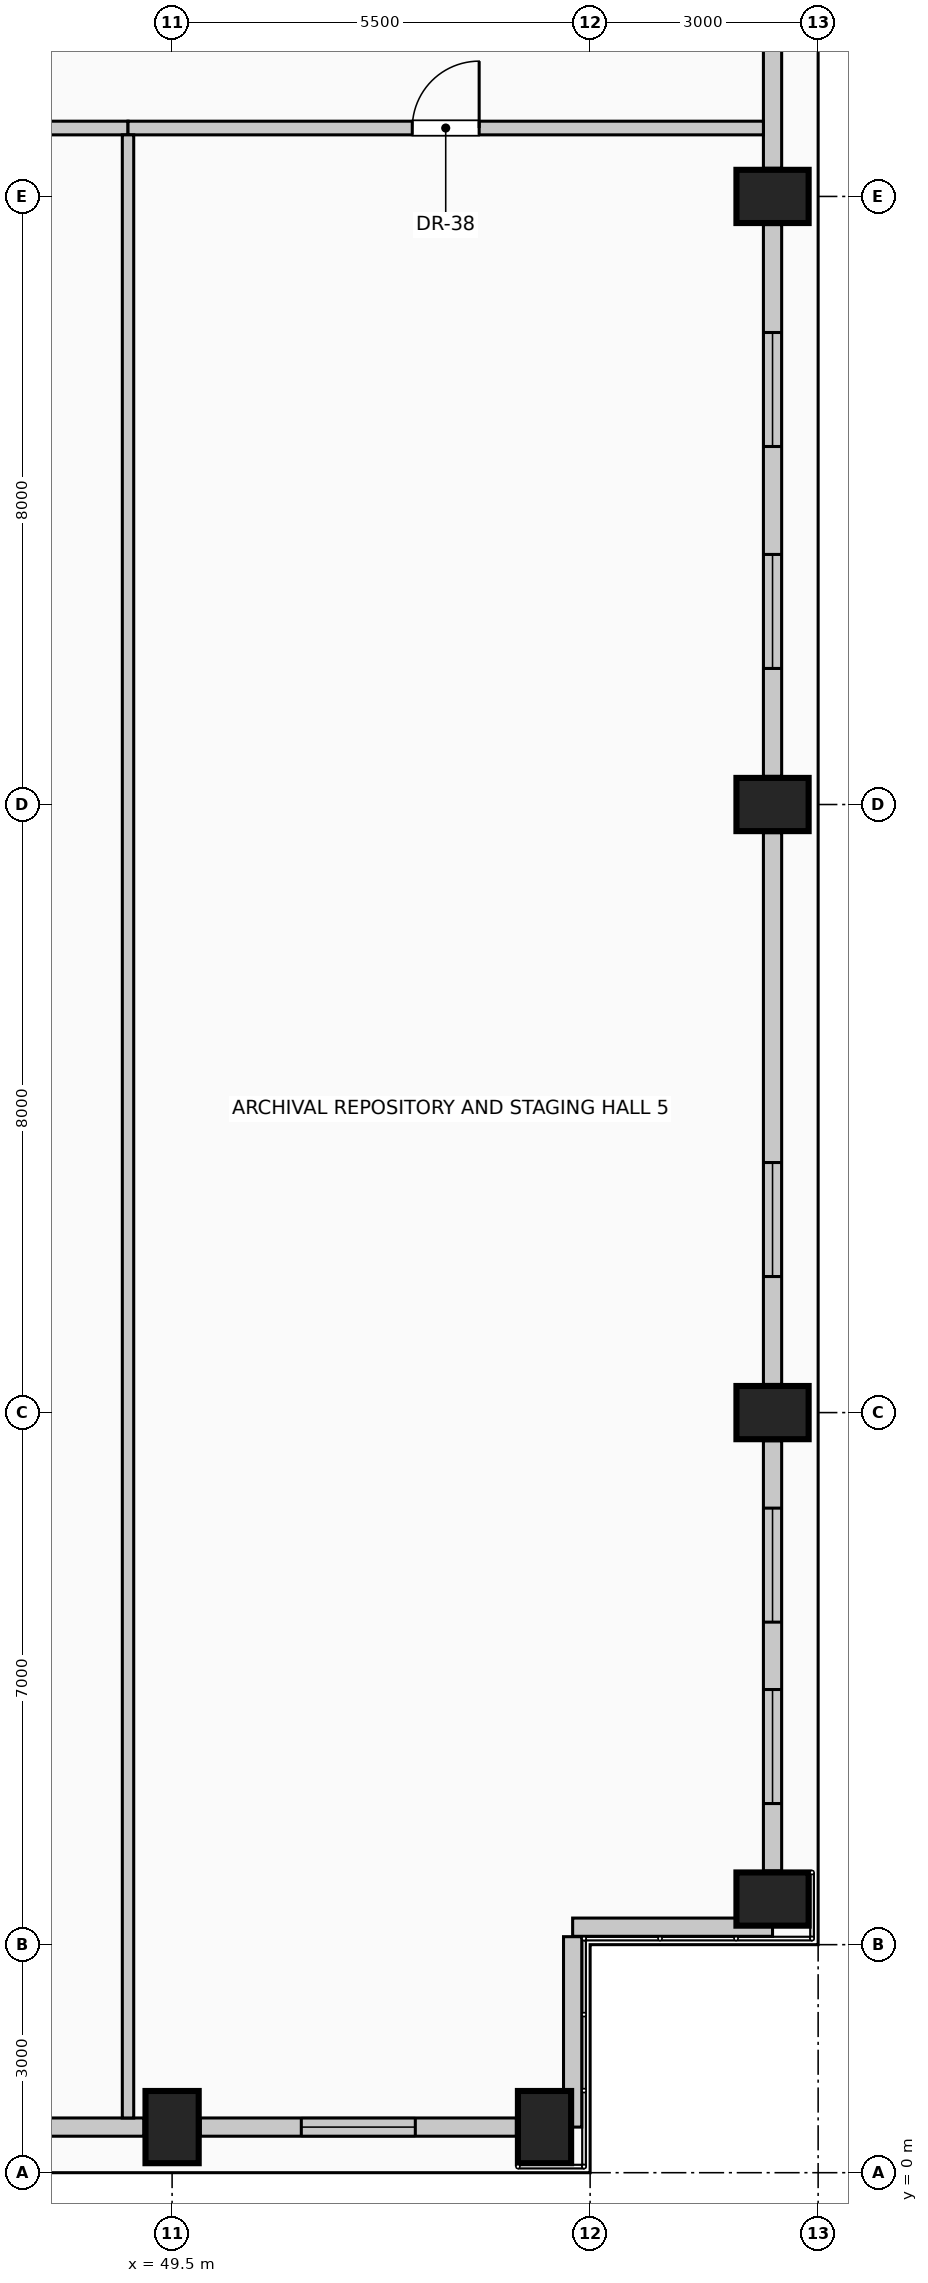
"""IFC4 building model, lengths in metres.
Left out: names, types, materials, properties, quantities, classifications, styles, units other than length and angle.
Written with IfcOpenShell. Run it as: python <this file> out.ifc"""

import sys

from ifc_helpers import new_model, si_unit, direction, frame, frame_2d, origin, origin_2d, place, context, subcontext, project, spatial, rectangle, extrude, element, fill, save


model = new_model("IFC4")
c1 = context("Model", 3, precision=1e-05, world=origin(), true_north=direction((0.0, 1.0)))
c2 = subcontext(c1, "Body", "Model", "MODEL_VIEW")
j1 = project(units=[si_unit("LENGTHUNIT", "METRE"), si_unit("PLANEANGLEUNIT", "RADIAN")], contexts=[c1])
p1 = place(None, origin())
s1 = spatial("IfcSite", under=j1, at=p1, CompositionType="ELEMENT")
p2 = place(p1, origin())
s2 = spatial("IfcBuilding", under=s1, at=p2, CompositionType="ELEMENT")
p3 = place(p2, frame((0.0, 0.0, 276.6)))
s3 = spatial("IfcBuildingStorey", under=s2, at=p3, CompositionType="ELEMENT", Elevation=276.6)
for number, where, z_axis, x_axis in (
    (1, (49.5, 0.6, 0.0), (0.0, 0.0, 1.0), (1.0, 0.0, 0.0)),
    (2, (54.4, 0.6, 0.0), (0.0, 0.0, 1.0), (1.0, 0.0, 0.0)),
    (3, (57.4, 3.6, 0.0), (0.0, 0.0, 1.0), (0.0, 1.0, 0.0)),
    (4, (57.4, 10.0, 0.0), (0.0, 0.0, 1.0), (0.0, 1.0, 0.0)),
    (5, (57.4, 18.0, 0.0), (0.0, 0.0, 1.0), (0.0, 1.0, 0.0)),
    (6, (57.4, 26.0, 0.0), (0.0, 0.0, 1.0), (0.0, 1.0, 0.0)),
):
    element("IfcColumn", number, at=place(p3, frame(where, z_axis=z_axis, x_axis=x_axis)), inside=s3, PredefinedType="COLUMN", context=c2, shape_type="SweptSolid", body=[
        extrude(rectangle(XDim=0.7, YDim=0.95, at=origin_2d()), origin(), (0.0, 0.0, 1.0), 4.0),
    ])
p4 = place(p3, frame((49.13, 0.6, 0.0), z_axis=(0.0, 0.0, 1.0), x_axis=(-1.0, 0.0, 0.0)))
e7 = element("IfcWall", 7, at=p4, inside=s3, PredefinedType="SOLIDWALL", context=c2, shape_type="SweptSolid", body=[
    extrude(rectangle(XDim=4.76, YDim=0.24, at=frame_2d((2.38, 0.0))), origin(), (0.0, 0.0, 1.0), 2.91),
])
p5 = place(p3, frame((54.03, 0.6, 0.0), z_axis=(0.0, 0.0, 1.0), x_axis=(-1.0, 0.0, 0.0)))
e8 = element("IfcWall", 8, at=p5, inside=s3, PredefinedType="SOLIDWALL", context=c2, shape_type="SweptSolid", body=[
    extrude(rectangle(XDim=4.16, YDim=0.24, at=frame_2d((2.08, 0.0))), origin(), (0.0, 0.0, 1.0), 2.91),
])
p6 = place(p5, frame((1.33, 0.0, 0.42)))
e9 = element("IfcOpeningElement", 9, at=p6, cuts=e8, PredefinedType="OPENING", context=c2, shape_type="SweptSolid", body=[
    extrude(rectangle(XDim=1.5, YDim=2.2, at=frame_2d((0.75, 1.1))), frame((0.0, 0.13, 0.0), z_axis=(0.0, -1.0, 0.0), x_axis=(1.0, 0.0, 0.0)), (0.0, 0.0, 1.0), 0.26),
])
p7 = place(p3, frame((57.4, 9.63, 0.0), z_axis=(0.0, 0.0, 1.0), x_axis=(0.0, -1.0, 0.0)))
e10 = element("IfcWall", 10, at=p7, inside=s3, PredefinedType="SOLIDWALL", context=c2, shape_type="SweptSolid", body=[
    extrude(rectangle(XDim=5.66, YDim=0.24, at=frame_2d((2.83, 0.0))), origin(), (0.0, 0.0, 1.0), 2.91),
])
p8 = place(p7, frame((0.887, 0.0, 0.42)))
e11 = element("IfcOpeningElement", 11, at=p8, cuts=e10, PredefinedType="OPENING", context=c2, shape_type="SweptSolid", body=[
    extrude(rectangle(XDim=1.5, YDim=2.2, at=frame_2d((0.75, 1.1))), frame((0.0, 0.13, 0.0), z_axis=(0.0, -1.0, 0.0), x_axis=(1.0, 0.0, 0.0)), (0.0, 0.0, 1.0), 0.26),
])
p9 = place(p7, frame((3.273, 0.0, 0.42)))
e12 = element("IfcOpeningElement", 12, at=p9, cuts=e10, PredefinedType="OPENING", context=c2, shape_type="SweptSolid", body=[
    extrude(rectangle(XDim=1.5, YDim=2.2, at=frame_2d((0.75, 1.1))), frame((0.0, 0.13, 0.0), z_axis=(0.0, -1.0, 0.0), x_axis=(1.0, 0.0, 0.0)), (0.0, 0.0, 1.0), 0.26),
])
p10 = place(p3, frame((57.4, 17.63, 0.0), z_axis=(0.0, 0.0, 1.0), x_axis=(0.0, -1.0, 0.0)))
e13 = element("IfcWall", 13, at=p10, inside=s3, PredefinedType="SOLIDWALL", context=c2, shape_type="SweptSolid", body=[
    extrude(rectangle(XDim=7.26, YDim=0.24, at=frame_2d((3.63, 0.0))), origin(), (0.0, 0.0, 1.0), 2.91),
])
p11 = place(p10, frame((4.34, 0.0, 0.42)))
e14 = element("IfcOpeningElement", 14, at=p11, cuts=e13, PredefinedType="OPENING", context=c2, shape_type="SweptSolid", body=[
    extrude(rectangle(XDim=1.5, YDim=2.2, at=frame_2d((0.75, 1.1))), frame((0.0, 0.13, 0.0), z_axis=(0.0, -1.0, 0.0), x_axis=(1.0, 0.0, 0.0)), (0.0, 0.0, 1.0), 0.26),
])
p12 = place(p3, frame((57.4, 25.63, 0.0), z_axis=(0.0, 0.0, 1.0), x_axis=(0.0, -1.0, 0.0)))
e15 = element("IfcWall", 15, at=p12, inside=s3, PredefinedType="SOLIDWALL", context=c2, shape_type="SweptSolid", body=[
    extrude(rectangle(XDim=7.26, YDim=0.24, at=frame_2d((3.63, 0.0))), origin(), (0.0, 0.0, 1.0), 2.91),
])
p13 = place(p12, frame((1.42, 0.0, 0.42)))
e16 = element("IfcOpeningElement", 16, at=p13, cuts=e15, PredefinedType="OPENING", context=c2, shape_type="SweptSolid", body=[
    extrude(rectangle(XDim=1.5, YDim=2.2, at=frame_2d((0.75, 1.1))), frame((0.0, 0.13, 0.0), z_axis=(0.0, -1.0, 0.0), x_axis=(1.0, 0.0, 0.0)), (0.0, 0.0, 1.0), 0.26),
])
p14 = place(p12, frame((4.34, 0.0, 0.42)))
e17 = element("IfcOpeningElement", 17, at=p14, cuts=e15, PredefinedType="OPENING", context=c2, shape_type="SweptSolid", body=[
    extrude(rectangle(XDim=1.5, YDim=2.2, at=frame_2d((0.75, 1.1))), frame((0.0, 0.13, 0.0), z_axis=(0.0, -1.0, 0.0), x_axis=(1.0, 0.0, 0.0)), (0.0, 0.0, 1.0), 0.26),
])
p15 = place(p3, frame((57.4, 33.63, 0.0), z_axis=(0.0, 0.0, 1.0), x_axis=(0.0, -1.0, 0.0)))
e18 = element("IfcWall", 18, at=p15, inside=s3, PredefinedType="SOLIDWALL", context=c2, shape_type="SweptSolid", body=[
    extrude(rectangle(XDim=7.26, YDim=0.24, at=frame_2d((3.63, 0.0))), origin(), (0.0, 0.0, 1.0), 2.91),
])
p16 = place(p3, frame((57.4, 3.23, 0.0), z_axis=(0.0, 0.0, 1.0), x_axis=(-1.0, 0.0, 0.0)))
e19 = element("IfcWall", 19, at=p16, inside=s3, PredefinedType="SOLIDWALL", context=c2, shape_type="SweptSolid", body=[
    extrude(rectangle(XDim=2.63, YDim=0.24, at=frame_2d((1.315, 0.0))), origin(), (0.0, 0.0, 1.0), 3.66),
])
p17 = place(p3, frame((54.77, 3.105, 0.0), z_axis=(0.0, 0.0, 1.0), x_axis=(0.0, -1.0, 0.0)))
e20 = element("IfcWall", 20, at=p17, inside=s3, PredefinedType="SOLIDWALL", context=c2, shape_type="SweptSolid", body=[
    extrude(rectangle(XDim=2.505, YDim=0.24, at=frame_2d((1.252, 0.0))), origin(), (0.0, 0.0, 1.0), 3.66),
])
p18 = place(p3, frame((43.96, 26.9, 0.0), z_axis=(0.0, 0.0, 1.0), x_axis=(1.0, 0.0, 0.0)))
e21 = element("IfcWall", 21, at=p18, inside=s3, PredefinedType="PARTITIONING", context=c2, shape_type="SweptSolid", body=[
    extrude(rectangle(XDim=4.96, YDim=0.18, at=frame_2d((2.48, 0.0))), origin(), (0.0, 0.0, 1.0), 3.66),
])
p19 = place(p18, frame((2.005, 0.0, 0.0)))
e22 = element("IfcOpeningElement", 22, at=p19, cuts=e21, PredefinedType="OPENING", context=c2, shape_type="SweptSolid", body=[
    extrude(rectangle(XDim=0.95, YDim=2.15, at=frame_2d((0.475, 1.075))), frame((0.0, 0.1, 0.0), z_axis=(0.0, -1.0, 0.0), x_axis=(1.0, 0.0, 0.0)), (0.0, 0.0, 1.0), 0.2),
])
p20 = place(p3, frame((48.92, 26.9, 0.0), z_axis=(0.0, 0.0, 1.0), x_axis=(1.0, 0.0, 0.0)))
e23 = element("IfcWall", 23, at=p20, inside=s3, PredefinedType="PARTITIONING", context=c2, shape_type="SweptSolid", body=[
    extrude(rectangle(XDim=8.36, YDim=0.18, at=frame_2d((4.18, 0.0))), origin(), (0.0, 0.0, 1.0), 3.66),
])
p21 = place(p20, frame((3.74, 0.0, 0.0)))
e24 = element("IfcOpeningElement", 24, at=p21, cuts=e23, PredefinedType="OPENING", context=c2, shape_type="SweptSolid", body=[
    extrude(rectangle(XDim=0.88, YDim=2.1, at=frame_2d((0.44, 1.05))), frame((0.0, 0.1, 0.0), z_axis=(0.0, -1.0, 0.0), x_axis=(1.0, 0.0, 0.0)), (0.0, 0.0, 1.0), 0.2),
])
p22 = place(p3, frame((48.92, 0.72, 0.0), z_axis=(0.0, 0.0, 1.0), x_axis=(0.0, 1.0, 0.0)))
e25 = element("IfcWall", 25, at=p22, inside=s3, PredefinedType="PARTITIONING", context=c2, shape_type="SweptSolid", body=[
    extrude(rectangle(XDim=26.09, YDim=0.15, at=frame_2d((13.045, 0.0))), origin(), (0.0, 0.0, 1.0), 3.66),
])
p23 = place(p6, origin())
e26 = element("IfcWindow", 26, at=p23, inside=s3, PartitioningType="SINGLE_PANEL", PredefinedType="WINDOW", context=c2, shape_type="SweptSolid", body=[
    extrude(rectangle(XDim=1.5, YDim=2.2, at=frame_2d((0.75, 1.1))), frame((0.0, 0.03, 0.0), z_axis=(0.0, -1.0, 0.0), x_axis=(1.0, 0.0, 0.0)), (0.0, 0.0, 1.0), 0.06),
])
fill(e9, e26)
p24 = place(p8, origin())
e27 = element("IfcWindow", 27, at=p24, inside=s3, PartitioningType="SINGLE_PANEL", PredefinedType="WINDOW", context=c2, shape_type="SweptSolid", body=[
    extrude(rectangle(XDim=1.5, YDim=2.2, at=frame_2d((0.75, 1.1))), frame((0.0, 0.03, 0.0), z_axis=(0.0, -1.0, 0.0), x_axis=(1.0, 0.0, 0.0)), (0.0, 0.0, 1.0), 0.06),
])
fill(e11, e27)
p25 = place(p9, origin())
e28 = element("IfcWindow", 28, at=p25, inside=s3, PartitioningType="SINGLE_PANEL", PredefinedType="WINDOW", context=c2, shape_type="SweptSolid", body=[
    extrude(rectangle(XDim=1.5, YDim=2.2, at=frame_2d((0.75, 1.1))), frame((0.0, 0.03, 0.0), z_axis=(0.0, -1.0, 0.0), x_axis=(1.0, 0.0, 0.0)), (0.0, 0.0, 1.0), 0.06),
])
fill(e12, e28)
p26 = place(p11, origin())
e29 = element("IfcWindow", 29, at=p26, inside=s3, PartitioningType="SINGLE_PANEL", PredefinedType="WINDOW", context=c2, shape_type="SweptSolid", body=[
    extrude(rectangle(XDim=1.5, YDim=2.2, at=frame_2d((0.75, 1.1))), frame((0.0, 0.03, 0.0), z_axis=(0.0, -1.0, 0.0), x_axis=(1.0, 0.0, 0.0)), (0.0, 0.0, 1.0), 0.06),
])
fill(e14, e29)
p27 = place(p13, origin())
e30 = element("IfcWindow", 30, at=p27, inside=s3, PartitioningType="SINGLE_PANEL", PredefinedType="WINDOW", context=c2, shape_type="SweptSolid", body=[
    extrude(rectangle(XDim=1.5, YDim=2.2, at=frame_2d((0.75, 1.1))), frame((0.0, 0.03, 0.0), z_axis=(0.0, -1.0, 0.0), x_axis=(1.0, 0.0, 0.0)), (0.0, 0.0, 1.0), 0.06),
])
fill(e16, e30)
p28 = place(p14, origin())
e31 = element("IfcWindow", 31, at=p28, inside=s3, PartitioningType="SINGLE_PANEL", PredefinedType="WINDOW", context=c2, shape_type="SweptSolid", body=[
    extrude(rectangle(XDim=1.5, YDim=2.2, at=frame_2d((0.75, 1.1))), frame((0.0, 0.03, 0.0), z_axis=(0.0, -1.0, 0.0), x_axis=(1.0, 0.0, 0.0)), (0.0, 0.0, 1.0), 0.06),
])
fill(e17, e31)
p29 = place(p21, origin())
e32 = element("IfcDoor", 32, at=p29, inside=s3, OperationType="SINGLE_SWING_RIGHT", PredefinedType="DOOR", context=c2, shape_type="SweptSolid", body=[
    extrude(rectangle(XDim=0.88, YDim=2.1, at=frame_2d((0.44, 1.05))), frame((0.0, 0.025, 0.0), z_axis=(0.0, -1.0, 0.0), x_axis=(1.0, 0.0, 0.0)), (0.0, 0.0, 1.0), 0.05),
])
fill(e24, e32)
save(model, sys.argv[1])
